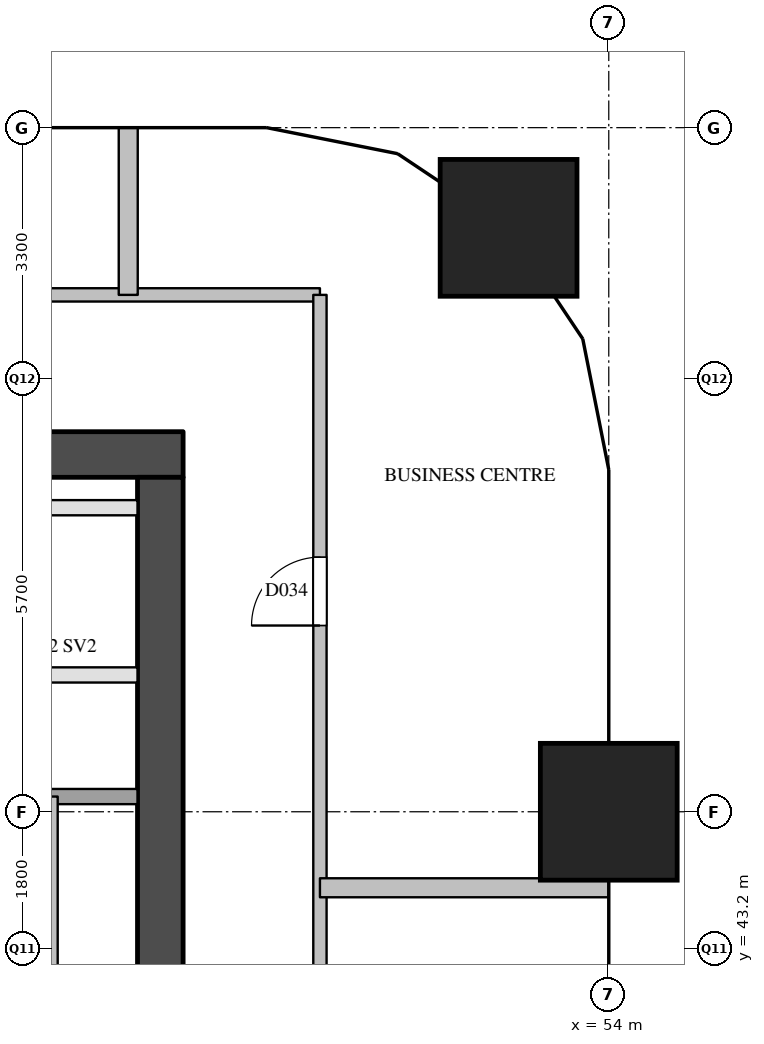
"""IFC4 building model, lengths in metres.
Left out: names, types, materials, properties, quantities, classifications, styles, units other than length and angle.
Written with IfcOpenShell. Run it as: python <this file> out.ifc"""

import sys

from ifc_helpers import new_model, si_unit, direction, frame, frame_2d, origin, origin_2d, place, context, subcontext, project, spatial, rectangle, extrude, element, fill, save


model = new_model("IFC4")
c1 = context("Model", 3, precision=1e-05, world=origin(), true_north=direction((0.0, 1.0)))
c2 = subcontext(c1, "Body", "Model", "MODEL_VIEW")
j1 = project(units=[si_unit("LENGTHUNIT", "METRE"), si_unit("PLANEANGLEUNIT", "RADIAN")], contexts=[c1])
p1 = place(None, origin())
s1 = spatial("IfcSite", under=j1, at=p1, CompositionType="ELEMENT")
p2 = place(p1, origin())
s2 = spatial("IfcBuilding", under=s1, at=p2, CompositionType="ELEMENT")
p3 = place(p2, frame((0.0, 0.0, 108.2)))
s3 = spatial("IfcBuildingStorey", under=s2, at=p3, CompositionType="ELEMENT", Elevation=108.2)
for number, where, z_axis, x_axis in (
    (1, (54.0, 45.0, 0.0), (0.0, 0.0, 1.0), (1.0, 0.0, 0.0)),
    (2, (52.682, 52.682, 0.0), (0.0, 0.0, 1.0), (1.0, 0.0, 0.0)),
):
    element("IfcColumn", number, at=place(p3, frame(where, z_axis=z_axis, x_axis=x_axis)), inside=s3, PredefinedType="COLUMN", context=c2, shape_type="SweptSolid", body=[
        extrude(rectangle(XDim=1.8, YDim=1.8, at=origin_2d()), origin(), (0.0, 0.0, 1.0), 3.8),
    ])
p4 = place(p3, frame((36.0, 49.7, 0.0), z_axis=(0.0, 0.0, 1.0), x_axis=(1.0, 0.0, 0.0)))
e3 = element("IfcWall", 3, at=p4, inside=s3, PredefinedType="SHEAR", context=c2, shape_type="SweptSolid", body=[
    extrude(rectangle(XDim=12.4, YDim=0.6, at=frame_2d((6.2, 0.0))), origin(), (0.0, 0.0, 1.0), 3.5),
])
p5 = place(p3, frame((48.1, 29.1, 0.0), z_axis=(0.0, 0.0, 1.0), x_axis=(0.0, 1.0, 0.0)))
e4 = element("IfcWall", 4, at=p5, inside=s3, PredefinedType="SHEAR", context=c2, shape_type="SweptSolid", body=[
    extrude(rectangle(XDim=20.3, YDim=0.6, at=frame_2d((10.15, 0.0))), origin(), (0.0, 0.0, 1.0), 3.5),
])
p6 = place(p5, frame((12.5, 0.0, 0.0)))
e5 = element("IfcOpeningElement", 5, at=p6, cuts=e4, PredefinedType="OPENING", context=c2, shape_type="SweptSolid", body=[
    extrude(rectangle(XDim=0.7, YDim=2.1, at=frame_2d((0.35, 1.05))), frame((0.0, 0.31, 0.0), z_axis=(0.0, -1.0, 0.0), x_axis=(1.0, 0.0, 0.0)), (0.0, 0.0, 1.0), 0.62),
])
p7 = place(p5, frame((3.9, 0.0, 0.0)))
e6 = element("IfcOpeningElement", 6, at=p7, cuts=e4, PredefinedType="OPENING", context=c2, shape_type="SweptSolid", body=[
    extrude(rectangle(XDim=1.8, YDim=2.1, at=frame_2d((0.9, 1.05))), frame((0.0, 0.31, 0.0), z_axis=(0.0, -1.0, 0.0), x_axis=(1.0, 0.0, 0.0)), (0.0, 0.0, 1.0), 0.62),
])
p8 = place(p3, frame((46.65, 40.78, 0.0), z_axis=(0.0, 0.0, 1.0), x_axis=(0.0, 1.0, 0.0)))
e7 = element("IfcWall", 7, at=p8, inside=s3, PredefinedType="SOLIDWALL", context=c2, shape_type="SweptSolid", body=[
    extrude(rectangle(XDim=4.42, YDim=0.2, at=frame_2d((2.21, 0.0))), origin(), (0.0, 0.0, 1.0), 3.5),
])
p9 = place(p3, frame((46.65, 45.2, 0.0), z_axis=(0.0, 0.0, 1.0), x_axis=(1.0, 0.0, 0.0)))
e8 = element("IfcWall", 8, at=p9, inside=s3, PredefinedType="SOLIDWALL", context=c2, shape_type="SweptSolid", body=[
    extrude(rectangle(XDim=1.15, YDim=0.2, at=frame_2d((0.575, 0.0))), origin(), (0.0, 0.0, 1.0), 3.5),
])
p10 = place(p3, frame((36.6, 46.8, 0.0), z_axis=(0.0, 0.0, 1.0), x_axis=(1.0, 0.0, 0.0)))
e9 = element("IfcWall", 9, at=p10, inside=s3, PredefinedType="PARTITIONING", context=c2, shape_type="SweptSolid", body=[
    extrude(rectangle(XDim=11.2, YDim=0.2, at=frame_2d((5.6, 0.0))), origin(), (0.0, 0.0, 1.0), 3.5),
])
p11 = place(p10, frame((1.23, 0.0, 0.0)))
e10 = element("IfcOpeningElement", 10, at=p11, cuts=e9, PredefinedType="OPENING", context=c2, shape_type="SweptSolid", body=[
    extrude(rectangle(XDim=0.9, YDim=2.1, at=frame_2d((0.45, 1.05))), frame((0.0, 0.11, 0.0), z_axis=(0.0, -1.0, 0.0), x_axis=(1.0, 0.0, 0.0)), (0.0, 0.0, 1.0), 0.22),
])
p12 = place(p10, frame((6.83, 0.0, 0.0)))
e11 = element("IfcOpeningElement", 11, at=p12, cuts=e9, PredefinedType="OPENING", context=c2, shape_type="SweptSolid", body=[
    extrude(rectangle(XDim=0.9, YDim=2.1, at=frame_2d((0.45, 1.05))), frame((0.0, 0.11, 0.0), z_axis=(0.0, -1.0, 0.0), x_axis=(1.0, 0.0, 0.0)), (0.0, 0.0, 1.0), 0.22),
])
p13 = place(p3, frame((36.6, 49.0, 0.0), z_axis=(0.0, 0.0, 1.0), x_axis=(1.0, 0.0, 0.0)))
e12 = element("IfcWall", 12, at=p13, inside=s3, PredefinedType="PARTITIONING", context=c2, shape_type="SweptSolid", body=[
    extrude(rectangle(XDim=11.2, YDim=0.2, at=frame_2d((5.6, 0.0))), origin(), (0.0, 0.0, 1.0), 3.5),
])
p14 = place(p3, frame((34.2, 51.8, 0.0), z_axis=(0.0, 0.0, 1.0), x_axis=(1.0, 0.0, 0.0)))
e13 = element("IfcWall", 13, at=p14, inside=s3, PredefinedType="PARTITIONING", context=c2, shape_type="SweptSolid", body=[
    extrude(rectangle(XDim=16.0, YDim=0.175, at=frame_2d((8.0, 0.0))), origin(), (0.0, 0.0, 1.0), 3.5),
])
p15 = place(p14, frame((7.189, 0.0, 0.0)))
e14 = element("IfcOpeningElement", 14, at=p15, cuts=e13, PredefinedType="OPENING", context=c2, shape_type="SweptSolid", body=[
    extrude(rectangle(XDim=0.9, YDim=2.1, at=frame_2d((0.45, 1.05))), frame((0.0, 0.097, 0.0), z_axis=(0.0, -1.0, 0.0), x_axis=(1.0, 0.0, 0.0)), (0.0, 0.0, 1.0), 0.195),
])
p16 = place(p3, frame((50.2, 26.7, 0.0), z_axis=(0.0, 0.0, 1.0), x_axis=(0.0, 1.0, 0.0)))
e15 = element("IfcWall", 15, at=p16, inside=s3, PredefinedType="PARTITIONING", context=c2, shape_type="SweptSolid", body=[
    extrude(rectangle(XDim=25.1, YDim=0.175, at=frame_2d((12.55, 0.0))), origin(), (0.0, 0.0, 1.0), 2.5),
])
p17 = place(p16, frame((4.85, 0.0, 0.0)))
e16 = element("IfcOpeningElement", 16, at=p17, cuts=e15, PredefinedType="OPENING", context=c2, shape_type="SweptSolid", body=[
    extrude(rectangle(XDim=0.9, YDim=2.1, at=frame_2d((0.45, 1.05))), frame((0.0, 0.097, 0.0), z_axis=(0.0, -1.0, 0.0), x_axis=(1.0, 0.0, 0.0)), (0.0, 0.0, 1.0), 0.195),
])
p18 = place(p16, frame((12.85, 0.0, 0.0)))
e17 = element("IfcOpeningElement", 17, at=p18, cuts=e15, PredefinedType="OPENING", context=c2, shape_type="SweptSolid", body=[
    extrude(rectangle(XDim=0.9, YDim=2.1, at=frame_2d((0.45, 1.05))), frame((0.0, 0.097, 0.0), z_axis=(0.0, -1.0, 0.0), x_axis=(1.0, 0.0, 0.0)), (0.0, 0.0, 1.0), 0.195),
])
p19 = place(p16, frame((20.75, 0.0, 0.0)))
e18 = element("IfcOpeningElement", 18, at=p19, cuts=e15, PredefinedType="OPENING", context=c2, shape_type="SweptSolid", body=[
    extrude(rectangle(XDim=0.9, YDim=2.1, at=frame_2d((0.45, 1.05))), frame((0.0, 0.097, 0.0), z_axis=(0.0, -1.0, 0.0), x_axis=(1.0, 0.0, 0.0)), (0.0, 0.0, 1.0), 0.195),
])
p20 = place(p3, frame((50.2, 44.0, 0.0), z_axis=(0.0, 0.0, 1.0), x_axis=(1.0, 0.0, 0.0)))
e19 = element("IfcWall", 19, at=p20, inside=s3, PredefinedType="PARTITIONING", context=c2, shape_type="SweptSolid", body=[
    extrude(rectangle(XDim=3.8, YDim=0.25, at=frame_2d((1.9, 0.0))), origin(), (0.0, 0.0, 1.0), 2.5),
])
p21 = place(p3, frame((47.678, 51.8, 0.0), z_axis=(0.0, 0.0, 1.0), x_axis=(0.0, 1.0, 0.0)))
e20 = element("IfcWall", 20, at=p21, inside=s3, PredefinedType="PARTITIONING", context=c2, shape_type="SweptSolid", body=[
    extrude(rectangle(XDim=2.2, YDim=0.25, at=frame_2d((1.1, 0.0))), origin(), (0.0, 0.0, 1.0), 2.5),
])
p22 = place(p19, origin())
e21 = element("IfcDoor", 21, at=p22, inside=s3, OperationType="SINGLE_SWING_LEFT", PredefinedType="DOOR", context=c2, shape_type="SweptSolid", body=[
    extrude(rectangle(XDim=0.9, YDim=2.1, at=frame_2d((0.45, 1.05))), frame((0.0, 0.025, 0.0), z_axis=(0.0, -1.0, 0.0), x_axis=(1.0, 0.0, 0.0)), (0.0, 0.0, 1.0), 0.05),
])
fill(e18, e21)
save(model, sys.argv[1])
